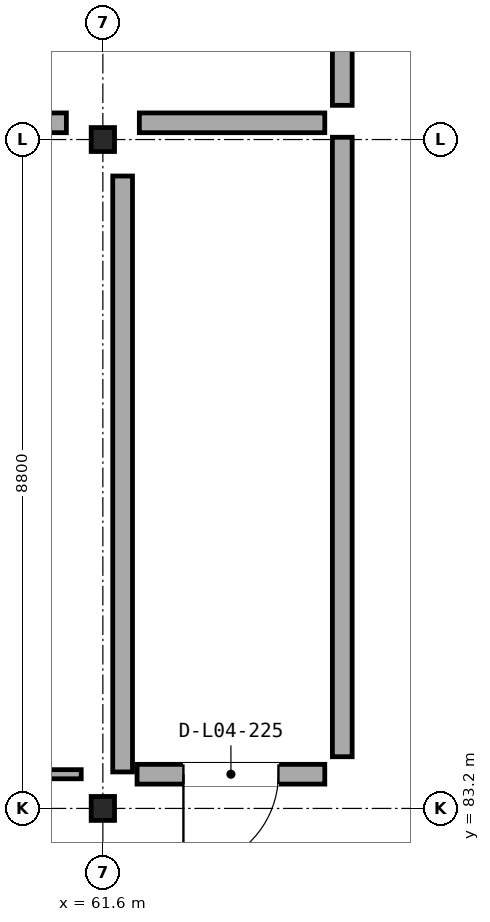
"""IFC4 building model, lengths in metres.
Left out: names, types, materials, properties, quantities, classifications, styles, units other than length and angle.
Written with IfcOpenShell. Run it as: python <this file> out.ifc"""

import sys

from ifc_helpers import new_model, si_unit, direction, frame, frame_2d, origin, origin_2d, place, context, subcontext, project, spatial, rectangle, i_section, extrude, element, fill, save


model = new_model("IFC4")
c1 = context("Model", 3, precision=1e-05, world=origin(), true_north=direction((0.0, 1.0)))
c2 = subcontext(c1, "Body", "Model", "MODEL_VIEW")
j1 = project(units=[si_unit("LENGTHUNIT", "METRE"), si_unit("PLANEANGLEUNIT", "RADIAN")], contexts=[c1])
p1 = place(None, origin())
s1 = spatial("IfcSite", under=j1, at=p1, CompositionType="ELEMENT")
p2 = place(p1, origin())
s2 = spatial("IfcBuilding", under=s1, at=p2, CompositionType="ELEMENT")
p3 = place(p2, frame((0.0, 0.0, 19.1)))
s3 = spatial("IfcBuildingStorey", under=s2, at=p3, CompositionType="ELEMENT", Elevation=19.1)
for number, where, z_axis, x_axis in (
    (1, (61.6, 83.2, 0.0), (0.0, 0.0, 1.0), (1.0, 0.0, 0.0)),
    (2, (61.6, 92.0, 0.0), (0.0, 0.0, 1.0), (1.0, 0.0, 0.0)),
):
    element("IfcColumn", number, at=place(p3, frame(where, z_axis=z_axis, x_axis=x_axis)), inside=s3, PredefinedType="COLUMN", context=c2, shape_type="SweptSolid", body=[
        extrude(i_section(OverallWidth=0.307, OverallDepth=0.315, WebThickness=0.012, FlangeThickness=0.019, FilletRadius=0.017, at=origin_2d()), origin(), (0.0, 0.0, 1.0), 9.0),
    ])
p4 = place(p3, frame((64.75, 107.64, 0.0), z_axis=(0.0, 0.0, 1.0), x_axis=(0.0, -1.0, 0.0)))
e3 = element("IfcWall", 3, at=p4, inside=s3, PredefinedType="SOLIDWALL", context=c2, shape_type="SweptSolid", body=[
    extrude(rectangle(XDim=15.19, YDim=0.26, at=frame_2d((7.595, 0.0))), origin(), (0.0, 0.0, 1.0), 8.187),
])
p5 = place(p3, frame((61.315, 83.65, 0.0), z_axis=(0.0, 0.0, 1.0), x_axis=(-1.0, 0.0, 0.0)))
e4 = element("IfcWall", 4, at=p5, inside=s3, PredefinedType="PARTITIONING", context=c2, shape_type="SweptSolid", body=[
    extrude(rectangle(XDim=9.031, YDim=0.12, at=frame_2d((4.515, 0.0))), origin(), (0.0, 0.0, 1.0), 8.263),
])
p6 = place(p5, frame((3.74, 0.0, 0.0)))
e5 = element("IfcOpeningElement", 5, at=p6, cuts=e4, PredefinedType="OPENING", context=c2, shape_type="SweptSolid", body=[
    extrude(rectangle(XDim=1.55, YDim=2.58, at=frame_2d((0.775, 1.29))), frame((0.0, 0.07, 0.0), z_axis=(0.0, -1.0, 0.0), x_axis=(1.0, 0.0, 0.0)), (0.0, 0.0, 1.0), 0.14),
])
p7 = place(p3, frame((64.52, 83.65, 0.0), z_axis=(0.0, 0.0, 1.0), x_axis=(-1.0, 0.0, 0.0)))
e6 = element("IfcWall", 6, at=p7, inside=s3, PredefinedType="SOLIDWALL", context=c2, shape_type="SweptSolid", body=[
    extrude(rectangle(XDim=2.47, YDim=0.26, at=frame_2d((1.235, 0.0))), origin(), (0.0, 0.0, 1.0), 8.364),
])
p8 = place(p7, frame((0.61, 0.0, 0.0)))
e7 = element("IfcOpeningElement", 7, at=p8, cuts=e6, PredefinedType="OPENING", context=c2, shape_type="SweptSolid", body=[
    extrude(rectangle(XDim=1.25, YDim=2.2, at=frame_2d((0.625, 1.1))), frame((0.0, 0.14, 0.0), z_axis=(0.0, -1.0, 0.0), x_axis=(1.0, 0.0, 0.0)), (0.0, 0.0, 1.0), 0.28),
])
p9 = place(p3, frame((64.75, 92.03, 0.0), z_axis=(0.0, 0.0, 1.0), x_axis=(0.0, -1.0, 0.0)))
e8 = element("IfcWall", 8, at=p9, inside=s3, PredefinedType="SOLIDWALL", context=c2, shape_type="SweptSolid", body=[
    extrude(rectangle(XDim=8.15, YDim=0.26, at=frame_2d((4.075, 0.0))), origin(), (0.0, 0.0, 1.0), 8.187),
])
p10 = place(p3, frame((61.12, 92.22, 0.0), z_axis=(0.0, 0.0, 1.0), x_axis=(-1.0, 0.0, 0.0)))
e9 = element("IfcWall", 9, at=p10, inside=s3, PredefinedType="SOLIDWALL", context=c2, shape_type="SweptSolid", body=[
    extrude(rectangle(XDim=8.64, YDim=0.26, at=frame_2d((4.32, 0.0))), origin(), (0.0, 0.0, 1.0), 8.187),
])
p11 = place(p3, frame((64.52, 92.22, 0.0), z_axis=(0.0, 0.0, 1.0), x_axis=(-1.0, 0.0, 0.0)))
e10 = element("IfcWall", 10, at=p11, inside=s3, PredefinedType="SOLIDWALL", context=c2, shape_type="SweptSolid", body=[
    extrude(rectangle(XDim=2.44, YDim=0.26, at=frame_2d((1.22, 0.0))), origin(), (0.0, 0.0, 1.0), 8.187),
])
p12 = place(p3, frame((61.86, 91.52, 0.0), z_axis=(0.0, 0.0, 1.0), x_axis=(0.0, -1.0, 0.0)))
e11 = element("IfcWall", 11, at=p12, inside=s3, PredefinedType="SOLIDWALL", context=c2, shape_type="SweptSolid", body=[
    extrude(rectangle(XDim=7.84, YDim=0.26, at=frame_2d((3.92, 0.0))), origin(), (0.0, 0.0, 1.0), 8.263),
])
p13 = place(p8, origin())
e12 = element("IfcDoor", 12, at=p13, inside=s3, OperationType="SINGLE_SWING_RIGHT", PredefinedType="DOOR", context=c2, shape_type="SweptSolid", body=[
    extrude(rectangle(XDim=1.25, YDim=2.2, at=frame_2d((0.625, 1.1))), frame((0.0, 0.025, 0.0), z_axis=(0.0, -1.0, 0.0), x_axis=(1.0, 0.0, 0.0)), (0.0, 0.0, 1.0), 0.05),
])
fill(e7, e12)
save(model, sys.argv[1])
